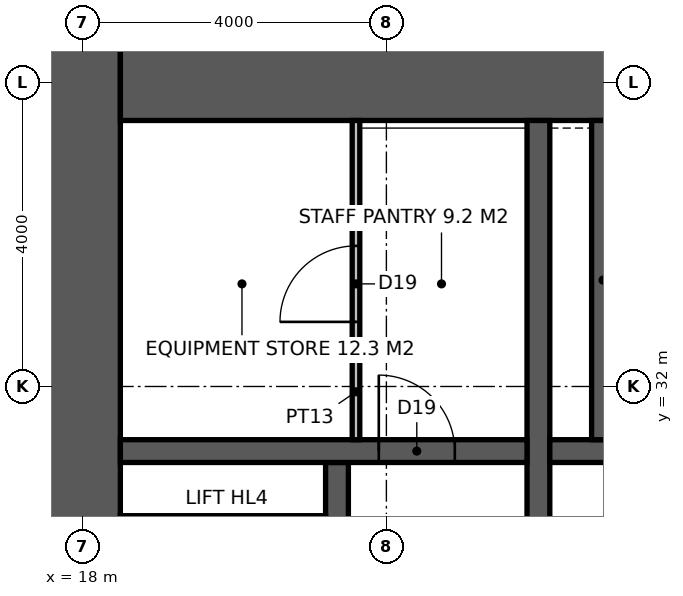
"""IFC4 building model, lengths in metres.
Left out: names, types, materials, properties, quantities, classifications, styles, units other than length and angle.
Written with IfcOpenShell. Run it as: python <this file> out.ifc"""

import sys

from ifc_helpers import new_model, si_unit, direction, frame, frame_2d, origin, place, context, subcontext, project, spatial, rectangle, extrude, element, fill, save


model = new_model("IFC4")
c1 = context("Model", 3, precision=1e-05, world=origin(), true_north=direction((0.0, 1.0)))
c2 = subcontext(c1, "Body", "Model", "MODEL_VIEW")
j1 = project(units=[si_unit("LENGTHUNIT", "METRE"), si_unit("PLANEANGLEUNIT", "RADIAN")], contexts=[c1])
p1 = place(None, origin())
s1 = spatial("IfcSite", under=j1, at=p1, CompositionType="ELEMENT")
p2 = place(p1, origin())
s2 = spatial("IfcBuilding", under=s1, at=p2, CompositionType="ELEMENT")
p3 = place(p2, frame((0.0, 0.0, 175.8)))
s3 = spatial("IfcBuildingStorey", under=s2, at=p3, CompositionType="ELEMENT", Elevation=175.8)
p4 = place(p3, frame((18.0, 17.5, -0.15), z_axis=(0.0, 0.0, 1.0), x_axis=(0.0, 1.0, 0.0)))
e1 = element("IfcWall", 1, at=p4, inside=s3, PredefinedType="SHEAR", context=c2, shape_type="SweptSolid", body=[
    extrude(rectangle(XDim=19.0, YDim=1.0, at=frame_2d((9.5, 0.0))), origin(), (0.0, 0.0, 1.0), 4.0),
])
p5 = place(p3, frame((18.5, 36.0, -0.15), z_axis=(0.0, 0.0, 1.0), x_axis=(1.0, 0.0, 0.0)))
e2 = element("IfcWall", 2, at=p5, inside=s3, PredefinedType="SHEAR", context=c2, shape_type="SweptSolid", body=[
    extrude(rectangle(XDim=17.6, YDim=1.0, at=frame_2d((8.8, 0.0))), origin(), (0.0, 0.0, 1.0), 4.0),
])
p6 = place(p3, frame((24.0, 18.5, -0.15), z_axis=(0.0, 0.0, 1.0), x_axis=(0.0, 1.0, 0.0)))
e3 = element("IfcWall", 3, at=p6, inside=s3, PredefinedType="SHEAR", context=c2, shape_type="SweptSolid", body=[
    extrude(rectangle(XDim=17.0, YDim=0.3, at=frame_2d((8.5, 0.0))), origin(), (0.0, 0.0, 1.0), 4.0),
])
p7 = place(p6, frame((9.6, 0.0, 0.15)))
e4 = element("IfcOpeningElement", 4, at=p7, cuts=e3, PredefinedType="OPENING", context=c2, shape_type="SweptSolid", body=[
    extrude(rectangle(XDim=1.5, YDim=2.4, at=frame_2d((0.75, 1.2))), frame((0.0, 0.16, 0.0), z_axis=(0.0, -1.0, 0.0), x_axis=(1.0, 0.0, 0.0)), (0.0, 0.0, 1.0), 0.32),
])
p8 = place(p3, frame((24.15, 31.15, -0.15), z_axis=(0.0, 0.0, 1.0), x_axis=(1.0, 0.0, 0.0)))
e5 = element("IfcWall", 5, at=p8, inside=s3, PredefinedType="SHEAR", context=c2, shape_type="SweptSolid", body=[
    extrude(rectangle(XDim=11.25, YDim=0.3, at=frame_2d((5.625, 0.0))), origin(), (0.0, 0.0, 1.0), 4.0),
])
p9 = place(p8, frame((7.25, 0.0, 0.15)))
e6 = element("IfcOpeningElement", 6, at=p9, cuts=e5, PredefinedType="OPENING", context=c2, shape_type="SweptSolid", body=[
    extrude(rectangle(XDim=1.4, YDim=2.4, at=frame_2d((0.7, 1.2))), frame((0.0, 0.16, 0.0), z_axis=(0.0, -1.0, 0.0), x_axis=(1.0, 0.0, 0.0)), (0.0, 0.0, 1.0), 0.32),
])
p10 = place(p3, frame((21.35, 18.5, -0.15), z_axis=(0.0, 0.0, 1.0), x_axis=(0.0, 1.0, 0.0)))
e7 = element("IfcWall", 7, at=p10, inside=s3, PredefinedType="SHEAR", context=c2, shape_type="SweptSolid", body=[
    extrude(rectangle(XDim=12.5, YDim=0.3, at=frame_2d((6.25, 0.0))), origin(), (0.0, 0.0, 1.0), 4.0),
])
p11 = place(p10, frame((0.875, 0.0, 0.15)))
e8 = element("IfcOpeningElement", 8, at=p11, cuts=e7, PredefinedType="OPENING", context=c2, shape_type="SweptSolid", body=[
    extrude(rectangle(XDim=1.1, YDim=2.2, at=frame_2d((0.55, 1.1))), frame((0.0, 0.16, 0.0), z_axis=(0.0, -1.0, 0.0), x_axis=(1.0, 0.0, 0.0)), (0.0, 0.0, 1.0), 0.32),
])
p12 = place(p10, frame((3.825, 0.0, 0.15)))
e9 = element("IfcOpeningElement", 9, at=p12, cuts=e7, PredefinedType="OPENING", context=c2, shape_type="SweptSolid", body=[
    extrude(rectangle(XDim=1.1, YDim=2.2, at=frame_2d((0.55, 1.1))), frame((0.0, 0.16, 0.0), z_axis=(0.0, -1.0, 0.0), x_axis=(1.0, 0.0, 0.0)), (0.0, 0.0, 1.0), 0.32),
])
p13 = place(p10, frame((6.675, 0.0, 0.15)))
e10 = element("IfcOpeningElement", 10, at=p13, cuts=e7, PredefinedType="OPENING", context=c2, shape_type="SweptSolid", body=[
    extrude(rectangle(XDim=1.1, YDim=2.2, at=frame_2d((0.55, 1.1))), frame((0.0, 0.16, 0.0), z_axis=(0.0, -1.0, 0.0), x_axis=(1.0, 0.0, 0.0)), (0.0, 0.0, 1.0), 0.32),
])
p14 = place(p10, frame((9.575, 0.0, 0.15)))
e11 = element("IfcOpeningElement", 11, at=p14, cuts=e7, PredefinedType="OPENING", context=c2, shape_type="SweptSolid", body=[
    extrude(rectangle(XDim=1.1, YDim=2.2, at=frame_2d((0.55, 1.1))), frame((0.0, 0.16, 0.0), z_axis=(0.0, -1.0, 0.0), x_axis=(1.0, 0.0, 0.0)), (0.0, 0.0, 1.0), 0.32),
])
p15 = place(p3, frame((18.5, 31.15, -0.15), z_axis=(0.0, 0.0, 1.0), x_axis=(1.0, 0.0, 0.0)))
e12 = element("IfcWall", 12, at=p15, inside=s3, PredefinedType="SHEAR", context=c2, shape_type="SweptSolid", body=[
    extrude(rectangle(XDim=5.35, YDim=0.3, at=frame_2d((2.675, 0.0))), origin(), (0.0, 0.0, 1.0), 4.0),
])
p16 = place(p15, frame((3.4, 0.0, 0.15)))
e13 = element("IfcOpeningElement", 13, at=p16, cuts=e12, PredefinedType="OPENING", context=c2, shape_type="SweptSolid", body=[
    extrude(rectangle(XDim=1.0, YDim=2.2, at=frame_2d((0.5, 1.1))), frame((0.0, 0.16, 0.0), z_axis=(0.0, -1.0, 0.0), x_axis=(1.0, 0.0, 0.0)), (0.0, 0.0, 1.0), 0.32),
])
p17 = place(p3, frame((24.85, 31.3, -0.15), z_axis=(0.0, 0.0, 1.0), x_axis=(0.0, 1.0, 0.0)))
e14 = element("IfcWall", 14, at=p17, inside=s3, PredefinedType="SHEAR", context=c2, shape_type="SweptSolid", body=[
    extrude(rectangle(XDim=4.2, YDim=0.3, at=frame_2d((2.1, 0.0))), origin(), (0.0, 0.0, 1.0), 4.0),
])
p18 = place(p3, frame((21.6, 31.3, 0.0), z_axis=(0.0, 0.0, 1.0), x_axis=(0.0, 1.0, 0.0)))
e15 = element("IfcWall", 15, at=p18, inside=s3, PredefinedType="PARTITIONING", context=c2, shape_type="SweptSolid", body=[
    extrude(rectangle(XDim=4.2, YDim=0.1, at=frame_2d((2.1, 0.0))), origin(), (0.0, 0.0, 1.0), 3.85),
])
p19 = place(p18, frame((1.55, 0.0, 0.0)))
e16 = element("IfcOpeningElement", 16, at=p19, cuts=e15, PredefinedType="OPENING", context=c2, shape_type="SweptSolid", body=[
    extrude(rectangle(XDim=1.0, YDim=2.2, at=frame_2d((0.5, 1.1))), frame((0.0, 0.06, 0.0), z_axis=(0.0, -1.0, 0.0), x_axis=(1.0, 0.0, 0.0)), (0.0, 0.0, 1.0), 0.12),
])
p20 = place(p16, origin())
e17 = element("IfcDoor", 17, at=p20, inside=s3, OperationType="SINGLE_SWING_LEFT", PredefinedType="DOOR", context=c2, shape_type="SweptSolid", body=[
    extrude(rectangle(XDim=1.0, YDim=2.2, at=frame_2d((0.5, 1.1))), frame((0.0, 0.025, 0.0), z_axis=(0.0, -1.0, 0.0), x_axis=(1.0, 0.0, 0.0)), (0.0, 0.0, 1.0), 0.05),
])
fill(e13, e17)
p21 = place(p19, origin())
e18 = element("IfcDoor", 18, at=p21, inside=s3, OperationType="SINGLE_SWING_LEFT", PredefinedType="DOOR", context=c2, shape_type="SweptSolid", body=[
    extrude(rectangle(XDim=1.0, YDim=2.2, at=frame_2d((0.5, 1.1))), frame((0.0, 0.025, 0.0), z_axis=(0.0, -1.0, 0.0), x_axis=(1.0, 0.0, 0.0)), (0.0, 0.0, 1.0), 0.05),
])
fill(e16, e18)
save(model, sys.argv[1])
